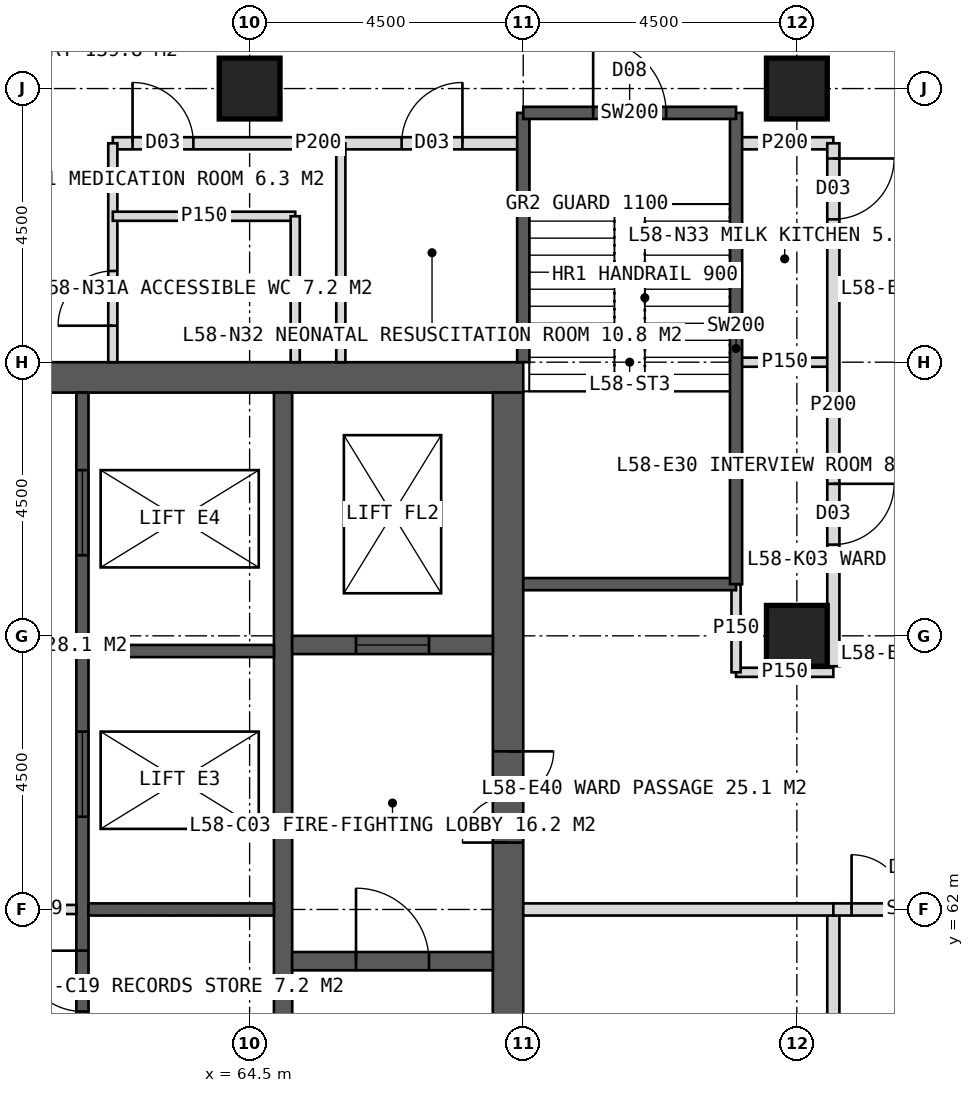
"""IFC4 building model, lengths in metres.
Left out: names, types, materials, properties, quantities, classifications, styles, units other than length and angle.
Written with IfcOpenShell. Run it as: python <this file> out.ifc"""

import sys

from ifc_helpers import new_model, si_unit, direction, frame, frame_2d, origin, origin_2d, place, context, subcontext, project, spatial, rectangle, hollow_rectangle, extrude, element, fill, save


model = new_model("IFC4")
c1 = context("Model", 3, precision=1e-05, world=origin(), true_north=direction((0.0, 1.0)))
c2 = subcontext(c1, "Body", "Model", "MODEL_VIEW")
j1 = project(units=[si_unit("LENGTHUNIT", "METRE"), si_unit("PLANEANGLEUNIT", "RADIAN")], contexts=[c1])
p1 = place(None, origin())
s1 = spatial("IfcSite", under=j1, at=p1, CompositionType="ELEMENT")
p2 = place(p1, origin())
s2 = spatial("IfcBuilding", under=s1, at=p2, CompositionType="ELEMENT")
p3 = place(p2, frame((0.0, 0.0, 241.0)))
s3 = spatial("IfcBuildingStorey", under=s2, at=p3, CompositionType="ELEMENT", Elevation=241.0)
p4 = place(p3, frame((51.0, 70.75, 0.0), z_axis=(0.0, 0.0, 1.0), x_axis=(1.0, 0.0, 0.0)))
e1 = element("IfcWall", 1, at=p4, inside=s3, PredefinedType="SHEAR", context=c2, shape_type="SweptSolid", body=[
    extrude(rectangle(XDim=18.0, YDim=0.5, at=frame_2d((9.0, 0.0))), origin(), (0.0, 0.0, 1.0), 4.0),
])
p5 = place(p4, frame((8.1, 0.0, 0.0)))
e2 = element("IfcOpeningElement", 2, at=p5, cuts=e1, PredefinedType="OPENING", context=c2, shape_type="SweptSolid", body=[
    extrude(rectangle(XDim=1.8, YDim=2.2, at=frame_2d((0.9, 1.1))), frame((0.0, 0.26, 0.0), z_axis=(0.0, -1.0, 0.0), x_axis=(1.0, 0.0, 0.0)), (0.0, 0.0, 1.0), 0.52),
])
p6 = place(p3, frame((68.75, 53.5, 0.0), z_axis=(0.0, 0.0, 1.0), x_axis=(0.0, 1.0, 0.0)))
e3 = element("IfcWall", 3, at=p6, inside=s3, PredefinedType="SHEAR", context=c2, shape_type="SweptSolid", body=[
    extrude(rectangle(XDim=17.0, YDim=0.5, at=frame_2d((8.5, 0.0))), origin(), (0.0, 0.0, 1.0), 4.0),
])
p7 = place(p6, frame((9.6, 0.0, 0.0)))
e4 = element("IfcOpeningElement", 4, at=p7, cuts=e3, PredefinedType="OPENING", context=c2, shape_type="SweptSolid", body=[
    extrude(rectangle(XDim=1.5, YDim=2.2, at=frame_2d((0.75, 1.1))), frame((0.0, 0.26, 0.0), z_axis=(0.0, -1.0, 0.0), x_axis=(1.0, 0.0, 0.0)), (0.0, 0.0, 1.0), 0.52),
])
p8 = place(p3, frame((65.05, 53.5, 0.0), z_axis=(0.0, 0.0, 1.0), x_axis=(0.0, 1.0, 0.0)))
e5 = element("IfcWall", 5, at=p8, inside=s3, PredefinedType="SHEAR", context=c2, shape_type="SweptSolid", body=[
    extrude(rectangle(XDim=17.0, YDim=0.3, at=frame_2d((8.5, 0.0))), origin(), (0.0, 0.0, 1.0), 4.0),
])
p9 = place(p3, frame((61.75, 53.5, 0.0), z_axis=(0.0, 0.0, 1.0), x_axis=(0.0, 1.0, 0.0)))
e6 = element("IfcWall", 6, at=p9, inside=s3, PredefinedType="SHEAR", context=c2, shape_type="SweptSolid", body=[
    extrude(rectangle(XDim=17.0, YDim=0.2, at=frame_2d((8.5, 0.0))), origin(), (0.0, 0.0, 1.0), 4.0),
])
p10 = place(p9, frame((0.808, 0.0, 0.0)))
e7 = element("IfcOpeningElement", 7, at=p10, cuts=e6, PredefinedType="OPENING", context=c2, shape_type="SweptSolid", body=[
    extrude(rectangle(XDim=1.0, YDim=2.1, at=frame_2d((0.5, 1.05))), frame((0.0, 0.11, 0.0), z_axis=(0.0, -1.0, 0.0), x_axis=(1.0, 0.0, 0.0)), (0.0, 0.0, 1.0), 0.22),
])
p11 = place(p9, frame((2.958, 0.0, 0.0)))
e8 = element("IfcOpeningElement", 8, at=p11, cuts=e6, PredefinedType="OPENING", context=c2, shape_type="SweptSolid", body=[
    extrude(rectangle(XDim=1.0, YDim=2.1, at=frame_2d((0.5, 1.05))), frame((0.0, 0.11, 0.0), z_axis=(0.0, -1.0, 0.0), x_axis=(1.0, 0.0, 0.0)), (0.0, 0.0, 1.0), 0.22),
])
p12 = place(p9, frame((4.722, 0.0, 0.0)))
e9 = element("IfcOpeningElement", 9, at=p12, cuts=e6, PredefinedType="OPENING", context=c2, shape_type="SweptSolid", body=[
    extrude(rectangle(XDim=1.0, YDim=2.1, at=frame_2d((0.5, 1.05))), frame((0.0, 0.11, 0.0), z_axis=(0.0, -1.0, 0.0), x_axis=(1.0, 0.0, 0.0)), (0.0, 0.0, 1.0), 0.22),
])
p13 = place(p9, frame((6.823, 0.0, 0.0)))
e10 = element("IfcOpeningElement", 10, at=p13, cuts=e6, PredefinedType="OPENING", context=c2, shape_type="SweptSolid", body=[
    extrude(rectangle(XDim=1.0, YDim=2.1, at=frame_2d((0.5, 1.05))), frame((0.0, 0.11, 0.0), z_axis=(0.0, -1.0, 0.0), x_axis=(1.0, 0.0, 0.0)), (0.0, 0.0, 1.0), 0.22),
])
p14 = place(p9, frame((10.025, 0.0, 0.0)))
e11 = element("IfcOpeningElement", 11, at=p14, cuts=e6, PredefinedType="OPENING", context=c2, shape_type="SweptSolid", body=[
    extrude(rectangle(XDim=1.4, YDim=2.2, at=frame_2d((0.7, 1.1))), frame((0.0, 0.11, 0.0), z_axis=(0.0, -1.0, 0.0), x_axis=(1.0, 0.0, 0.0)), (0.0, 0.0, 1.0), 0.22),
])
p15 = place(p9, frame((14.325, 0.0, 0.0)))
e12 = element("IfcOpeningElement", 12, at=p15, cuts=e6, PredefinedType="OPENING", context=c2, shape_type="SweptSolid", body=[
    extrude(rectangle(XDim=1.4, YDim=2.2, at=frame_2d((0.7, 1.1))), frame((0.0, 0.11, 0.0), z_axis=(0.0, -1.0, 0.0), x_axis=(1.0, 0.0, 0.0)), (0.0, 0.0, 1.0), 0.22),
])
for number, where, z_axis, x_axis in (
    (13, (61.85, 62.0, 0.0), (0.0, 0.0, 1.0), (1.0, 0.0, 0.0)),
    (14, (61.85, 66.25, 0.0), (0.0, 0.0, 1.0), (1.0, 0.0, 0.0)),
):
    element("IfcWall", number, at=place(p3, frame(where, z_axis=z_axis, x_axis=x_axis)), inside=s3, PredefinedType="SHEAR", context=c2, shape_type="SweptSolid", body=[
        extrude(rectangle(XDim=3.05, YDim=0.2, at=frame_2d((1.525, 0.0))), origin(), (0.0, 0.0, 1.0), 4.0),
    ])
p16 = place(p3, frame((65.2, 61.15, 0.0), z_axis=(0.0, 0.0, 1.0), x_axis=(1.0, 0.0, 0.0)))
e15 = element("IfcWall", 15, at=p16, inside=s3, PredefinedType="SHEAR", context=c2, shape_type="SweptSolid", body=[
    extrude(rectangle(XDim=3.3, YDim=0.3, at=frame_2d((1.65, 0.0))), origin(), (0.0, 0.0, 1.0), 4.0),
])
p17 = place(p16, frame((1.05, 0.0, 0.0)))
e16 = element("IfcOpeningElement", 16, at=p17, cuts=e15, PredefinedType="OPENING", context=c2, shape_type="SweptSolid", body=[
    extrude(rectangle(XDim=1.2, YDim=2.1, at=frame_2d((0.6, 1.05))), frame((0.0, 0.16, 0.0), z_axis=(0.0, -1.0, 0.0), x_axis=(1.0, 0.0, 0.0)), (0.0, 0.0, 1.0), 0.32),
])
p18 = place(p3, frame((65.2, 66.35, 0.0), z_axis=(0.0, 0.0, 1.0), x_axis=(1.0, 0.0, 0.0)))
e17 = element("IfcWall", 17, at=p18, inside=s3, PredefinedType="SHEAR", context=c2, shape_type="SweptSolid", body=[
    extrude(rectangle(XDim=3.3, YDim=0.3, at=frame_2d((1.65, 0.0))), origin(), (0.0, 0.0, 1.0), 4.0),
])
p19 = place(p18, frame((1.05, 0.0, 0.0)))
e18 = element("IfcOpeningElement", 18, at=p19, cuts=e17, PredefinedType="OPENING", context=c2, shape_type="SweptSolid", body=[
    extrude(rectangle(XDim=1.2, YDim=2.2, at=frame_2d((0.6, 1.1))), frame((0.0, 0.16, 0.0), z_axis=(0.0, -1.0, 0.0), x_axis=(1.0, 0.0, 0.0)), (0.0, 0.0, 1.0), 0.32),
])
for number, where, z_axis, x_axis in (
    (19, (73.5, 75.5, 0.0), (0.0, 0.0, 1.0), (1.0, 0.0, 0.0)),
    (20, (64.5, 75.5, 0.0), (0.0, 0.0, 1.0), (1.0, 0.0, 0.0)),
    (21, (73.5, 66.5, 0.0), (0.0, 0.0, 1.0), (1.0, 0.0, 0.0)),
):
    element("IfcColumn", number, at=place(p3, frame(where, z_axis=z_axis, x_axis=x_axis)), inside=s3, PredefinedType="COLUMN", context=c2, shape_type="SweptSolid", body=[
        extrude(hollow_rectangle(XDim=1.0, YDim=1.0, WallThickness=0.1, at=origin_2d()), origin(), (0.0, 0.0, 1.0), 4.0),
    ])
p20 = place(p3, frame((62.25, 74.6, 0.0), z_axis=(0.0, 0.0, 1.0), x_axis=(1.0, 0.0, 0.0)))
e22 = element("IfcWall", 22, at=p20, inside=s3, PredefinedType="PARTITIONING", context=c2, shape_type="SweptSolid", body=[
    extrude(rectangle(XDim=6.75, YDim=0.2, at=frame_2d((3.375, 0.0))), origin(), (0.0, 0.0, 1.0), 3.75),
])
p21 = place(p20, frame((0.325, 0.0, 0.0)))
e23 = element("IfcOpeningElement", 23, at=p21, cuts=e22, PredefinedType="OPENING", context=c2, shape_type="SweptSolid", body=[
    extrude(rectangle(XDim=1.0, YDim=2.1, at=frame_2d((0.5, 1.05))), frame((0.0, 0.11, 0.0), z_axis=(0.0, -1.0, 0.0), x_axis=(1.0, 0.0, 0.0)), (0.0, 0.0, 1.0), 0.22),
])
p22 = place(p20, frame((4.75, 0.0, 0.0)))
e24 = element("IfcOpeningElement", 24, at=p22, cuts=e22, PredefinedType="OPENING", context=c2, shape_type="SweptSolid", body=[
    extrude(rectangle(XDim=1.0, YDim=2.1, at=frame_2d((0.5, 1.05))), frame((0.0, 0.11, 0.0), z_axis=(0.0, -1.0, 0.0), x_axis=(1.0, 0.0, 0.0)), (0.0, 0.0, 1.0), 0.22),
])
p23 = place(p3, frame((72.5, 74.6, 0.0), z_axis=(0.0, 0.0, 1.0), x_axis=(1.0, 0.0, 0.0)))
e25 = element("IfcWall", 25, at=p23, inside=s3, PredefinedType="PARTITIONING", context=c2, shape_type="SweptSolid", body=[
    extrude(rectangle(XDim=1.6, YDim=0.2, at=frame_2d((0.8, 0.0))), origin(), (0.0, 0.0, 1.0), 3.75),
])
p24 = place(p3, frame((62.25, 71.0, 0.0), z_axis=(0.0, 0.0, 1.0), x_axis=(0.0, 1.0, 0.0)))
e26 = element("IfcWall", 26, at=p24, inside=s3, PredefinedType="PARTITIONING", context=c2, shape_type="SweptSolid", body=[
    extrude(rectangle(XDim=3.6, YDim=0.15, at=frame_2d((1.8, 0.0))), origin(), (0.0, 0.0, 1.0), 3.75),
])
p25 = place(p24, frame((0.6, 0.0, 0.0)))
e27 = element("IfcOpeningElement", 27, at=p25, cuts=e26, PredefinedType="OPENING", context=c2, shape_type="SweptSolid", body=[
    extrude(rectangle(XDim=0.9, YDim=2.1, at=frame_2d((0.45, 1.05))), frame((0.0, 0.085, 0.0), z_axis=(0.0, -1.0, 0.0), x_axis=(1.0, 0.0, 0.0)), (0.0, 0.0, 1.0), 0.17),
])
p26 = place(p3, frame((66.0, 71.0, 0.0), z_axis=(0.0, 0.0, 1.0), x_axis=(0.0, 1.0, 0.0)))
e28 = element("IfcWall", 28, at=p26, inside=s3, PredefinedType="PARTITIONING", context=c2, shape_type="SweptSolid", body=[
    extrude(rectangle(XDim=3.6, YDim=0.15, at=frame_2d((1.8, 0.0))), origin(), (0.0, 0.0, 1.0), 3.75),
])
p27 = place(p3, frame((62.25, 73.4, 0.0), z_axis=(0.0, 0.0, 1.0), x_axis=(1.0, 0.0, 0.0)))
e29 = element("IfcWall", 29, at=p27, inside=s3, PredefinedType="PARTITIONING", context=c2, shape_type="SweptSolid", body=[
    extrude(rectangle(XDim=3.0, YDim=0.15, at=frame_2d((1.5, 0.0))), origin(), (0.0, 0.0, 1.0), 3.75),
])
p28 = place(p3, frame((65.25, 71.0, 0.0), z_axis=(0.0, 0.0, 1.0), x_axis=(0.0, 1.0, 0.0)))
e30 = element("IfcWall", 30, at=p28, inside=s3, PredefinedType="PARTITIONING", context=c2, shape_type="SweptSolid", body=[
    extrude(rectangle(XDim=2.4, YDim=0.15, at=frame_2d((1.2, 0.0))), origin(), (0.0, 0.0, 1.0), 3.75),
])
p29 = place(p3, frame((72.5, 71.0, 0.0), z_axis=(0.0, 0.0, 1.0), x_axis=(1.0, 0.0, 0.0)))
e31 = element("IfcWall", 31, at=p29, inside=s3, PredefinedType="PARTITIONING", context=c2, shape_type="SweptSolid", body=[
    extrude(rectangle(XDim=1.6, YDim=0.15, at=frame_2d((0.8, 0.0))), origin(), (0.0, 0.0, 1.0), 3.75),
])
p30 = place(p3, frame((74.1, 74.6, 0.0), z_axis=(0.0, 0.0, 1.0), x_axis=(0.0, -1.0, 0.0)))
e32 = element("IfcWall", 32, at=p30, inside=s3, PredefinedType="PARTITIONING", context=c2, shape_type="SweptSolid", body=[
    extrude(rectangle(XDim=8.6, YDim=0.2, at=frame_2d((4.3, 0.0))), origin(), (0.0, 0.0, 1.0), 3.75),
])
p31 = place(p30, frame((0.25, 0.0, 0.0)))
e33 = element("IfcOpeningElement", 33, at=p31, cuts=e32, PredefinedType="OPENING", context=c2, shape_type="SweptSolid", body=[
    extrude(rectangle(XDim=1.0, YDim=2.1, at=frame_2d((0.5, 1.05))), frame((0.0, 0.11, 0.0), z_axis=(0.0, -1.0, 0.0), x_axis=(1.0, 0.0, 0.0)), (0.0, 0.0, 1.0), 0.22),
])
p32 = place(p30, frame((5.6, 0.0, 0.0)))
e34 = element("IfcOpeningElement", 34, at=p32, cuts=e32, PredefinedType="OPENING", context=c2, shape_type="SweptSolid", body=[
    extrude(rectangle(XDim=1.0, YDim=2.1, at=frame_2d((0.5, 1.05))), frame((0.0, 0.11, 0.0), z_axis=(0.0, -1.0, 0.0), x_axis=(1.0, 0.0, 0.0)), (0.0, 0.0, 1.0), 0.22),
])
p33 = place(p3, frame((74.1, 62.0, 0.0), z_axis=(0.0, 0.0, 1.0), x_axis=(0.0, -1.0, 0.0)))
e35 = element("IfcWall", 35, at=p33, inside=s3, PredefinedType="PARTITIONING", context=c2, shape_type="SweptSolid", body=[
    extrude(rectangle(XDim=14.1, YDim=0.2, at=frame_2d((7.05, 0.0))), origin(), (0.0, 0.0, 1.0), 3.75),
])
p34 = place(p33, frame((2.5, 0.0, 0.0)))
e36 = element("IfcOpeningElement", 36, at=p34, cuts=e35, PredefinedType="OPENING", context=c2, shape_type="SweptSolid", body=[
    extrude(rectangle(XDim=1.0, YDim=2.1, at=frame_2d((0.5, 1.05))), frame((0.0, 0.11, 0.0), z_axis=(0.0, -1.0, 0.0), x_axis=(1.0, 0.0, 0.0)), (0.0, 0.0, 1.0), 0.22),
])
p35 = place(p33, frame((7.0, 0.0, 0.0)))
e37 = element("IfcOpeningElement", 37, at=p35, cuts=e35, PredefinedType="OPENING", context=c2, shape_type="SweptSolid", body=[
    extrude(rectangle(XDim=1.0, YDim=2.1, at=frame_2d((0.5, 1.05))), frame((0.0, 0.11, 0.0), z_axis=(0.0, -1.0, 0.0), x_axis=(1.0, 0.0, 0.0)), (0.0, 0.0, 1.0), 0.22),
])
p36 = place(p33, frame((11.05, 0.0, 0.0)))
e38 = element("IfcOpeningElement", 38, at=p36, cuts=e35, PredefinedType="OPENING", context=c2, shape_type="SweptSolid", body=[
    extrude(rectangle(XDim=1.0, YDim=2.1, at=frame_2d((0.5, 1.05))), frame((0.0, 0.11, 0.0), z_axis=(0.0, -1.0, 0.0), x_axis=(1.0, 0.0, 0.0)), (0.0, 0.0, 1.0), 0.22),
])
p37 = place(p3, frame((72.5, 65.9, 0.0), z_axis=(0.0, 0.0, 1.0), x_axis=(1.0, 0.0, 0.0)))
e39 = element("IfcWall", 39, at=p37, inside=s3, PredefinedType="PARTITIONING", context=c2, shape_type="SweptSolid", body=[
    extrude(rectangle(XDim=1.6, YDim=0.15, at=frame_2d((0.8, 0.0))), origin(), (0.0, 0.0, 1.0), 3.75),
])
p38 = place(p3, frame((69.0, 62.0, 0.0), z_axis=(0.0, 0.0, 1.0), x_axis=(1.0, 0.0, 0.0)))
e40 = element("IfcWall", 40, at=p38, inside=s3, PredefinedType="SOLIDWALL", context=c2, shape_type="SweptSolid", body=[
    extrude(rectangle(XDim=5.1, YDim=0.2, at=frame_2d((2.55, 0.0))), origin(), (0.0, 0.0, 1.0), 2.95),
])
p39 = place(p3, frame((74.1, 62.0, 0.0), z_axis=(0.0, 0.0, 1.0), x_axis=(1.0, 0.0, 0.0)))
e41 = element("IfcWall", 41, at=p39, inside=s3, PredefinedType="SOLIDWALL", context=c2, shape_type="SweptSolid", body=[
    extrude(rectangle(XDim=2.7, YDim=0.2, at=frame_2d((1.35, 0.0))), origin(), (0.0, 0.0, 1.0), 2.95),
])
p40 = place(p39, frame((0.3, 0.0, 0.0)))
e42 = element("IfcOpeningElement", 42, at=p40, cuts=e41, PredefinedType="OPENING", context=c2, shape_type="SweptSolid", body=[
    extrude(rectangle(XDim=1.8, YDim=2.2, at=frame_2d((0.9, 1.1))), frame((0.0, 0.11, 0.0), z_axis=(0.0, -1.0, 0.0), x_axis=(1.0, 0.0, 0.0)), (0.0, 0.0, 1.0), 0.22),
])
p41 = place(p3, frame((58.35, 62.0, 0.0), z_axis=(0.0, 0.0, 1.0), x_axis=(1.0, 0.0, 0.0)))
e43 = element("IfcWall", 43, at=p41, inside=s3, PredefinedType="PARTITIONING", context=c2, shape_type="SweptSolid", body=[
    extrude(rectangle(XDim=3.3, YDim=0.15, at=frame_2d((1.65, 0.0))), origin(), (0.0, 0.0, 1.0), 3.75),
])
p42 = place(p3, frame((72.5, 65.9, 0.0), z_axis=(0.0, 0.0, 1.0), x_axis=(0.0, 1.0, 0.0)))
e44 = element("IfcWall", 44, at=p42, inside=s3, PredefinedType="PARTITIONING", context=c2, shape_type="SweptSolid", body=[
    extrude(rectangle(XDim=1.45, YDim=0.15, at=frame_2d((0.725, 0.0))), origin(), (0.0, 0.0, 1.0), 3.75),
])
p43 = place(p3, frame((69.0, 71.0, 0.0), z_axis=(0.0, 0.0, 1.0), x_axis=(0.0, 1.0, 0.0)))
e45 = element("IfcWall", 45, at=p43, inside=s3, PredefinedType="SOLIDWALL", context=c2, shape_type="SweptSolid", body=[
    extrude(rectangle(XDim=4.1, YDim=0.2, at=frame_2d((2.05, 0.0))), origin(), (0.0, 0.0, 1.0), 3.75),
])
p44 = place(p3, frame((69.0, 67.35, 0.0), z_axis=(0.0, 0.0, 1.0), x_axis=(1.0, 0.0, 0.0)))
e46 = element("IfcWall", 46, at=p44, inside=s3, PredefinedType="SOLIDWALL", context=c2, shape_type="SweptSolid", body=[
    extrude(rectangle(XDim=3.5, YDim=0.2, at=frame_2d((1.75, 0.0))), origin(), (0.0, 0.0, 1.0), 3.75),
])
p45 = place(p3, frame((72.5, 67.35, 0.0), z_axis=(0.0, 0.0, 1.0), x_axis=(0.0, 1.0, 0.0)))
e47 = element("IfcWall", 47, at=p45, inside=s3, PredefinedType="SOLIDWALL", context=c2, shape_type="SweptSolid", body=[
    extrude(rectangle(XDim=7.75, YDim=0.2, at=frame_2d((3.875, 0.0))), origin(), (0.0, 0.0, 1.0), 3.75),
])
p46 = place(p3, frame((69.0, 75.1, 0.0), z_axis=(0.0, 0.0, 1.0), x_axis=(1.0, 0.0, 0.0)))
e48 = element("IfcWall", 48, at=p46, inside=s3, PredefinedType="SOLIDWALL", context=c2, shape_type="SweptSolid", body=[
    extrude(rectangle(XDim=3.5, YDim=0.2, at=frame_2d((1.75, 0.0))), origin(), (0.0, 0.0, 1.0), 3.75),
])
p47 = place(p46, frame((1.15, 0.0, 0.0)))
e49 = element("IfcOpeningElement", 49, at=p47, cuts=e48, PredefinedType="OPENING", context=c2, shape_type="SweptSolid", body=[
    extrude(rectangle(XDim=1.2, YDim=2.1, at=frame_2d((0.6, 1.05))), frame((0.0, 0.11, 0.0), z_axis=(0.0, -1.0, 0.0), x_axis=(1.0, 0.0, 0.0)), (0.0, 0.0, 1.0), 0.22),
])
p48 = place(p25, origin())
e50 = element("IfcDoor", 50, at=p48, inside=s3, OperationType="SINGLE_SWING_LEFT", PredefinedType="DOOR", context=c2, shape_type="SweptSolid", body=[
    extrude(rectangle(XDim=0.9, YDim=2.1, at=frame_2d((0.45, 1.05))), frame((0.0, 0.025, 0.0), z_axis=(0.0, -1.0, 0.0), x_axis=(1.0, 0.0, 0.0)), (0.0, 0.0, 1.0), 0.05),
])
fill(e27, e50)
p49 = place(p21, origin())
e51 = element("IfcDoor", 51, at=p49, inside=s3, OperationType="SINGLE_SWING_LEFT", PredefinedType="DOOR", context=c2, shape_type="SweptSolid", body=[
    extrude(rectangle(XDim=1.0, YDim=2.1, at=frame_2d((0.5, 1.05))), frame((0.0, 0.025, 0.0), z_axis=(0.0, -1.0, 0.0), x_axis=(1.0, 0.0, 0.0)), (0.0, 0.0, 1.0), 0.05),
])
fill(e23, e51)
p50 = place(p22, origin())
e52 = element("IfcDoor", 52, at=p50, inside=s3, OperationType="SINGLE_SWING_RIGHT", PredefinedType="DOOR", context=c2, shape_type="SweptSolid", body=[
    extrude(rectangle(XDim=1.0, YDim=2.1, at=frame_2d((0.5, 1.05))), frame((0.0, 0.025, 0.0), z_axis=(0.0, -1.0, 0.0), x_axis=(1.0, 0.0, 0.0)), (0.0, 0.0, 1.0), 0.05),
])
fill(e24, e52)
p51 = place(p31, origin())
e53 = element("IfcDoor", 53, at=p51, inside=s3, OperationType="SINGLE_SWING_LEFT", PredefinedType="DOOR", context=c2, shape_type="SweptSolid", body=[
    extrude(rectangle(XDim=1.0, YDim=2.1, at=frame_2d((0.5, 1.05))), frame((0.0, 0.025, 0.0), z_axis=(0.0, -1.0, 0.0), x_axis=(1.0, 0.0, 0.0)), (0.0, 0.0, 1.0), 0.05),
])
fill(e33, e53)
p52 = place(p32, origin())
e54 = element("IfcDoor", 54, at=p52, inside=s3, OperationType="SINGLE_SWING_LEFT", PredefinedType="DOOR", context=c2, shape_type="SweptSolid", body=[
    extrude(rectangle(XDim=1.0, YDim=2.1, at=frame_2d((0.5, 1.05))), frame((0.0, 0.025, 0.0), z_axis=(0.0, -1.0, 0.0), x_axis=(1.0, 0.0, 0.0)), (0.0, 0.0, 1.0), 0.05),
])
fill(e34, e54)
p53 = place(p40, origin())
e55 = element("IfcDoor", 55, at=p53, inside=s3, OperationType="DOUBLE_DOOR_DOUBLE_SWING", PredefinedType="DOOR", context=c2, shape_type="SweptSolid", body=[
    extrude(rectangle(XDim=1.8, YDim=2.2, at=frame_2d((0.9, 1.1))), frame((0.0, 0.025, 0.0), z_axis=(0.0, -1.0, 0.0), x_axis=(1.0, 0.0, 0.0)), (0.0, 0.0, 1.0), 0.05),
])
fill(e42, e55)
p54 = place(p7, origin())
e56 = element("IfcDoor", 56, at=p54, inside=s3, OperationType="DOUBLE_DOOR_SINGLE_SWING", PredefinedType="DOOR", context=c2, shape_type="SweptSolid", body=[
    extrude(rectangle(XDim=1.5, YDim=2.2, at=frame_2d((0.75, 1.1))), frame((0.0, 0.025, 0.0), z_axis=(0.0, -1.0, 0.0), x_axis=(1.0, 0.0, 0.0)), (0.0, 0.0, 1.0), 0.05),
])
fill(e4, e56)
p55 = place(p17, origin())
e57 = element("IfcDoor", 57, at=p55, inside=s3, OperationType="SINGLE_SWING_LEFT", PredefinedType="DOOR", context=c2, shape_type="SweptSolid", body=[
    extrude(rectangle(XDim=1.2, YDim=2.1, at=frame_2d((0.6, 1.05))), frame((0.0, 0.025, 0.0), z_axis=(0.0, -1.0, 0.0), x_axis=(1.0, 0.0, 0.0)), (0.0, 0.0, 1.0), 0.05),
])
fill(e16, e57)
p56 = place(p19, origin())
e58 = element("IfcDoor", 58, at=p56, inside=s3, OperationType="SLIDING_TO_LEFT", PredefinedType="DOOR", context=c2, shape_type="SweptSolid", body=[
    extrude(rectangle(XDim=1.2, YDim=2.2, at=frame_2d((0.6, 1.1))), frame((0.0, 0.025, 0.0), z_axis=(0.0, -1.0, 0.0), x_axis=(1.0, 0.0, 0.0)), (0.0, 0.0, 1.0), 0.05),
])
fill(e18, e58)
p57 = place(p13, origin())
e59 = element("IfcDoor", 59, at=p57, inside=s3, OperationType="SINGLE_SWING_RIGHT", PredefinedType="DOOR", context=c2, shape_type="SweptSolid", body=[
    extrude(rectangle(XDim=1.0, YDim=2.1, at=frame_2d((0.5, 1.05))), frame((0.0, 0.025, 0.0), z_axis=(0.0, -1.0, 0.0), x_axis=(1.0, 0.0, 0.0)), (0.0, 0.0, 1.0), 0.05),
])
fill(e10, e59)
p58 = place(p14, origin())
e60 = element("IfcDoor", 60, at=p58, inside=s3, OperationType="SLIDING_TO_LEFT", PredefinedType="DOOR", context=c2, shape_type="SweptSolid", body=[
    extrude(rectangle(XDim=1.4, YDim=2.2, at=frame_2d((0.7, 1.1))), frame((0.0, 0.025, 0.0), z_axis=(0.0, -1.0, 0.0), x_axis=(1.0, 0.0, 0.0)), (0.0, 0.0, 1.0), 0.05),
])
fill(e11, e60)
p59 = place(p15, origin())
e61 = element("IfcDoor", 61, at=p59, inside=s3, OperationType="SLIDING_TO_LEFT", PredefinedType="DOOR", context=c2, shape_type="SweptSolid", body=[
    extrude(rectangle(XDim=1.4, YDim=2.2, at=frame_2d((0.7, 1.1))), frame((0.0, 0.025, 0.0), z_axis=(0.0, -1.0, 0.0), x_axis=(1.0, 0.0, 0.0)), (0.0, 0.0, 1.0), 0.05),
])
fill(e12, e61)
p60 = place(p47, origin())
e62 = element("IfcDoor", 62, at=p60, inside=s3, OperationType="SINGLE_SWING_LEFT", PredefinedType="DOOR", context=c2, shape_type="SweptSolid", body=[
    extrude(rectangle(XDim=1.2, YDim=2.1, at=frame_2d((0.6, 1.05))), frame((0.0, 0.025, 0.0), z_axis=(0.0, -1.0, 0.0), x_axis=(1.0, 0.0, 0.0)), (0.0, 0.0, 1.0), 0.05),
])
fill(e49, e62)
save(model, sys.argv[1])
